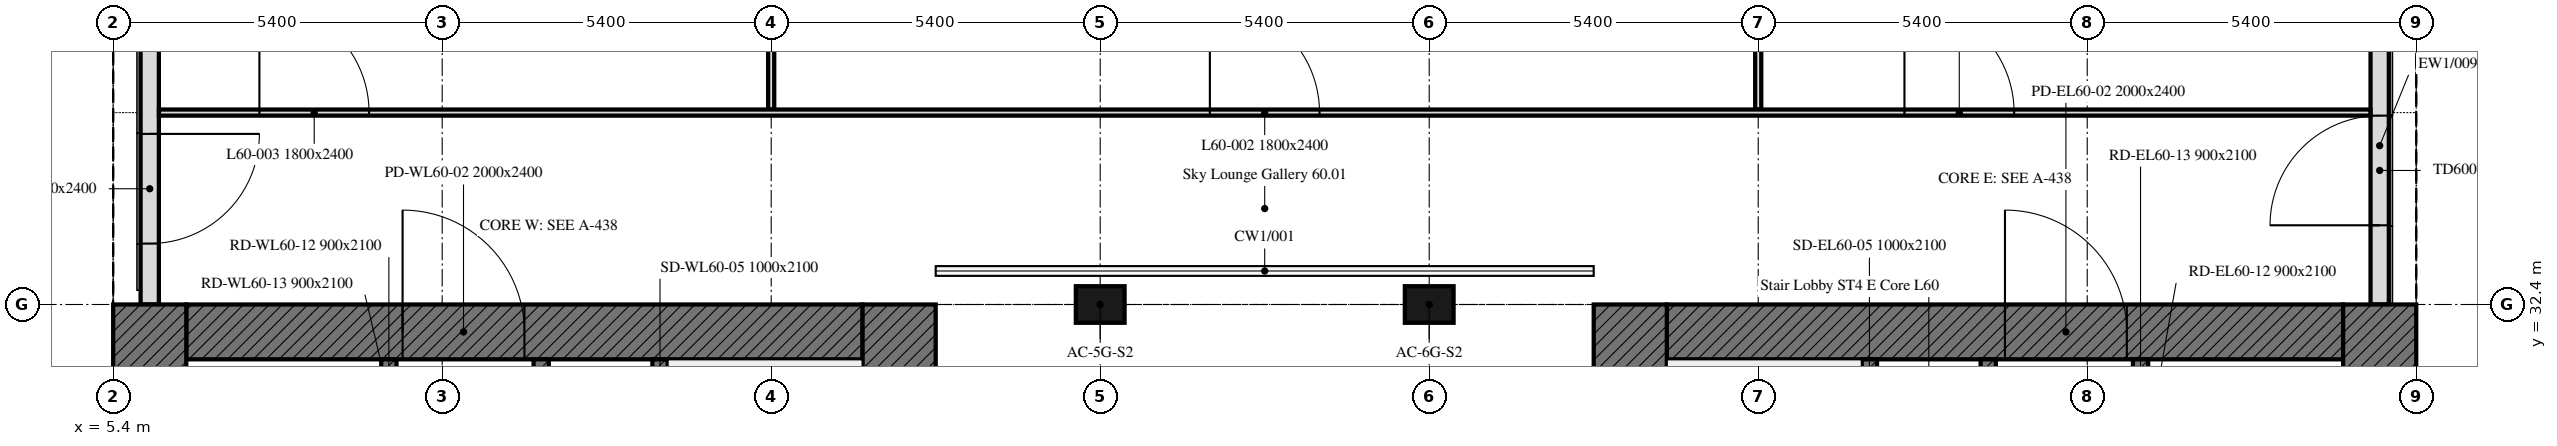
"""IFC4 building model, lengths in metres.
Left out: names, types, materials, properties, quantities, classifications, styles, units other than length and angle.
Written with IfcOpenShell. Run it as: python <this file> out.ifc"""

import sys

from ifc_helpers import new_model, si_unit, direction, frame, frame_2d, origin, origin_2d, place, context, subcontext, project, spatial, rectangle, extrude, element, fill, save


model = new_model("IFC4")
c1 = context("Model", 3, precision=1e-05, world=origin(), true_north=direction((0.0, 1.0)))
c2 = subcontext(c1, "Body", "Model", "MODEL_VIEW")
j1 = project(units=[si_unit("LENGTHUNIT", "METRE"), si_unit("PLANEANGLEUNIT", "RADIAN")], contexts=[c1])
p1 = place(None, origin())
s1 = spatial("IfcSite", under=j1, at=p1, CompositionType="ELEMENT")
p2 = place(p1, origin())
s2 = spatial("IfcBuilding", under=s1, at=p2, CompositionType="ELEMENT")
p3 = place(p2, frame((0.0, 0.0, 243.1)))
s3 = spatial("IfcBuildingStorey", under=s2, at=p3, CompositionType="ELEMENT", Elevation=243.1)
for number, where, z_axis, x_axis in (
    (1, (21.6, 32.4, 0.0), (0.0, 0.0, 1.0), (1.0, 0.0, 0.0)),
    (2, (27.0, 32.4, 0.0), (0.0, 0.0, 1.0), (1.0, 0.0, 0.0)),
):
    element("IfcColumn", number, at=place(p3, frame(where, z_axis=z_axis, x_axis=x_axis)), inside=s3, PredefinedType="COLUMN", context=c2, shape_type="SweptSolid", body=[
        extrude(rectangle(XDim=0.8, YDim=0.6, at=origin_2d()), origin(), (0.0, 0.0, 1.0), 7.5),
    ])
p4 = place(p3, frame((42.6, 32.4, 0.0), z_axis=(0.0, 0.0, 1.0), x_axis=(0.0, 1.0, 0.0)))
e3 = element("IfcWall", 3, at=p4, inside=s3, PredefinedType="SOLIDWALL", context=c2, shape_type="SweptSolid", body=[
    extrude(rectangle(XDim=5.214, YDim=0.3, at=frame_2d((2.607, 0.0))), origin(), (0.0, 0.0, 1.0), 7.5),
])
p5 = place(p4, frame((1.3, 0.0, 0.0)))
e4 = element("IfcOpeningElement", 4, at=p5, cuts=e3, PredefinedType="OPENING", context=c2, shape_type="SweptSolid", body=[
    extrude(rectangle(XDim=1.8, YDim=2.4, at=frame_2d((0.9, 1.2))), frame((0.0, 0.16, 0.0), z_axis=(0.0, -1.0, 0.0), x_axis=(1.0, 0.0, 0.0)), (0.0, 0.0, 1.0), 0.32),
])
p6 = place(p3, frame((6.0, 42.6, 0.0), z_axis=(0.0, 0.0, 1.0), x_axis=(0.0, -1.0, 0.0)))
e5 = element("IfcWall", 5, at=p6, inside=s3, PredefinedType="SOLIDWALL", context=c2, shape_type="SweptSolid", body=[
    extrude(rectangle(XDim=10.2, YDim=0.3, at=frame_2d((5.1, 0.0))), origin(), (0.0, 0.0, 1.0), 7.5),
])
p7 = place(p6, frame((1.2, 0.0, 0.0)))
e6 = element("IfcOpeningElement", 6, at=p7, cuts=e5, PredefinedType="OPENING", context=c2, shape_type="SweptSolid", body=[
    extrude(rectangle(XDim=1.8, YDim=2.4, at=frame_2d((0.9, 1.2))), frame((0.0, 0.16, 0.0), z_axis=(0.0, -1.0, 0.0), x_axis=(1.0, 0.0, 0.0)), (0.0, 0.0, 1.0), 0.32),
])
p8 = place(p6, frame((7.4, 0.0, 0.0)))
e7 = element("IfcOpeningElement", 7, at=p8, cuts=e5, PredefinedType="OPENING", context=c2, shape_type="SweptSolid", body=[
    extrude(rectangle(XDim=1.8, YDim=2.4, at=frame_2d((0.9, 1.2))), frame((0.0, 0.16, 0.0), z_axis=(0.0, -1.0, 0.0), x_axis=(1.0, 0.0, 0.0)), (0.0, 0.0, 1.0), 0.32),
])
p9 = place(p3, frame((6.6, 31.95, 0.0), z_axis=(0.0, 0.0, 1.0), x_axis=(1.0, 0.0, 0.0)))
e8 = element("IfcWall", 8, at=p9, inside=s3, PredefinedType="SOLIDWALL", context=c2, shape_type="SweptSolid", body=[
    extrude(rectangle(XDim=11.1, YDim=0.9, at=frame_2d((5.55, 0.0))), origin(), (0.0, 0.0, 1.0), 7.5),
])
p10 = place(p9, frame((3.55, 0.0, 0.0)))
e9 = element("IfcOpeningElement", 9, at=p10, cuts=e8, PredefinedType="OPENING", context=c2, shape_type="SweptSolid", body=[
    extrude(rectangle(XDim=2.0, YDim=2.4, at=frame_2d((1.0, 1.2))), frame((0.0, 0.45, 0.0), z_axis=(0.0, -1.0, 0.0), x_axis=(1.0, 0.0, 0.0)), (0.0, 0.0, 1.0), 0.9),
])
for number, where, z_axis, x_axis in (
    (10, (6.0, 16.2, 0.0), (0.0, 0.0, 1.0), (0.0, 1.0, 0.0)),
    (11, (18.3, 32.4, 0.0), (0.0, 0.0, 1.0), (0.0, -1.0, 0.0)),
):
    element("IfcWall", number, at=place(p3, frame(where, z_axis=z_axis, x_axis=x_axis)), inside=s3, PredefinedType="SOLIDWALL", context=c2, shape_type="SweptSolid", body=[
        extrude(rectangle(XDim=16.2, YDim=1.2, at=frame_2d((8.1, 0.0))), origin(), (0.0, 0.0, 1.0), 7.5),
    ])
p11 = place(p3, frame((9.925, 17.1, 0.0), z_axis=(0.0, 0.0, 1.0), x_axis=(0.0, 1.0, 0.0)))
e12 = element("IfcWall", 12, at=p11, inside=s3, PredefinedType="SOLIDWALL", context=c2, shape_type="SweptSolid", body=[
    extrude(rectangle(XDim=14.4, YDim=0.25, at=frame_2d((7.2, 0.0))), origin(), (0.0, 0.0, 1.0), 7.5),
])
p12 = place(p11, frame((4.6, 0.0, 0.0)))
e13 = element("IfcOpeningElement", 13, at=p12, cuts=e12, PredefinedType="OPENING", context=c2, shape_type="SweptSolid", body=[
    extrude(rectangle(XDim=1.0, YDim=2.1, at=frame_2d((0.5, 1.05))), frame((0.0, 0.125, 0.0), z_axis=(0.0, -1.0, 0.0), x_axis=(1.0, 0.0, 0.0)), (0.0, 0.0, 1.0), 0.25),
])
p13 = place(p11, frame((7.062, 0.0, 0.0)))
e14 = element("IfcOpeningElement", 14, at=p13, cuts=e12, PredefinedType="OPENING", context=c2, shape_type="SweptSolid", body=[
    extrude(rectangle(XDim=1.2, YDim=2.1, at=frame_2d((0.6, 1.05))), frame((0.0, 0.125, 0.0), z_axis=(0.0, -1.0, 0.0), x_axis=(1.0, 0.0, 0.0)), (0.0, 0.0, 1.0), 0.25),
])
p14 = place(p11, frame((10.106, 0.0, 0.0)))
e15 = element("IfcOpeningElement", 15, at=p14, cuts=e12, PredefinedType="OPENING", context=c2, shape_type="SweptSolid", body=[
    extrude(rectangle(XDim=0.9, YDim=2.1, at=frame_2d((0.45, 1.05))), frame((0.0, 0.125, 0.0), z_axis=(0.0, -1.0, 0.0), x_axis=(1.0, 0.0, 0.0)), (0.0, 0.0, 1.0), 0.25),
])
p15 = place(p11, frame((12.048, 0.0, 0.0)))
e16 = element("IfcOpeningElement", 16, at=p15, cuts=e12, PredefinedType="OPENING", context=c2, shape_type="SweptSolid", body=[
    extrude(rectangle(XDim=0.9, YDim=2.1, at=frame_2d((0.45, 1.05))), frame((0.0, 0.125, 0.0), z_axis=(0.0, -1.0, 0.0), x_axis=(1.0, 0.0, 0.0)), (0.0, 0.0, 1.0), 0.25),
])
p16 = place(p11, frame((13.354, 0.0, 0.0)))
e17 = element("IfcOpeningElement", 17, at=p16, cuts=e12, PredefinedType="OPENING", context=c2, shape_type="SweptSolid", body=[
    extrude(rectangle(XDim=0.9, YDim=2.1, at=frame_2d((0.45, 1.05))), frame((0.0, 0.125, 0.0), z_axis=(0.0, -1.0, 0.0), x_axis=(1.0, 0.0, 0.0)), (0.0, 0.0, 1.0), 0.25),
])
p17 = place(p3, frame((14.375, 17.1, 0.0), z_axis=(0.0, 0.0, 1.0), x_axis=(0.0, 1.0, 0.0)))
e18 = element("IfcWall", 18, at=p17, inside=s3, PredefinedType="SOLIDWALL", context=c2, shape_type="SweptSolid", body=[
    extrude(rectangle(XDim=14.4, YDim=0.25, at=frame_2d((7.2, 0.0))), origin(), (0.0, 0.0, 1.0), 7.5),
])
p18 = place(p17, frame((13.15, 0.0, 0.0)))
e19 = element("IfcOpeningElement", 19, at=p18, cuts=e18, PredefinedType="OPENING", context=c2, shape_type="SweptSolid", body=[
    extrude(rectangle(XDim=1.0, YDim=2.1, at=frame_2d((0.5, 1.05))), frame((0.0, 0.125, 0.0), z_axis=(0.0, -1.0, 0.0), x_axis=(1.0, 0.0, 0.0)), (0.0, 0.0, 1.0), 0.25),
])
p19 = place(p17, frame((0.6, 0.0, 0.0)))
e20 = element("IfcOpeningElement", 20, at=p19, cuts=e18, PredefinedType="OPENING", context=c2, shape_type="SweptSolid", body=[
    extrude(rectangle(XDim=1.1, YDim=2.1, at=frame_2d((0.55, 1.05))), frame((0.0, 0.125, 0.0), z_axis=(0.0, -1.0, 0.0), x_axis=(1.0, 0.0, 0.0)), (0.0, 0.0, 1.0), 0.25),
])
p20 = place(p17, frame((3.15, 0.0, 0.0)))
e21 = element("IfcOpeningElement", 21, at=p20, cuts=e18, PredefinedType="OPENING", context=c2, shape_type="SweptSolid", body=[
    extrude(rectangle(XDim=1.1, YDim=2.1, at=frame_2d((0.55, 1.05))), frame((0.0, 0.125, 0.0), z_axis=(0.0, -1.0, 0.0), x_axis=(1.0, 0.0, 0.0)), (0.0, 0.0, 1.0), 0.25),
])
p21 = place(p17, frame((6.025, 0.0, 0.0)))
e22 = element("IfcOpeningElement", 22, at=p21, cuts=e18, PredefinedType="OPENING", context=c2, shape_type="SweptSolid", body=[
    extrude(rectangle(XDim=1.2, YDim=2.1, at=frame_2d((0.6, 1.05))), frame((0.0, 0.125, 0.0), z_axis=(0.0, -1.0, 0.0), x_axis=(1.0, 0.0, 0.0)), (0.0, 0.0, 1.0), 0.25),
])
p22 = place(p3, frame((12.425, 29.4, 0.0), z_axis=(0.0, 0.0, 1.0), x_axis=(0.0, 1.0, 0.0)))
e23 = element("IfcWall", 23, at=p22, inside=s3, PredefinedType="SOLIDWALL", context=c2, shape_type="SweptSolid", body=[
    extrude(rectangle(XDim=2.1, YDim=0.25, at=frame_2d((1.05, 0.0))), origin(), (0.0, 0.0, 1.0), 7.5),
])
p23 = place(p22, frame((0.5, 0.0, 0.0)))
e24 = element("IfcOpeningElement", 24, at=p23, cuts=e23, PredefinedType="OPENING", context=c2, shape_type="SweptSolid", body=[
    extrude(rectangle(XDim=1.0, YDim=2.1, at=frame_2d((0.5, 1.05))), frame((0.0, 0.125, 0.0), z_axis=(0.0, -1.0, 0.0), x_axis=(1.0, 0.0, 0.0)), (0.0, 0.0, 1.0), 0.25),
])
p24 = place(p3, frame((30.9, 31.95, 0.0), z_axis=(0.0, 0.0, 1.0), x_axis=(1.0, 0.0, 0.0)))
e25 = element("IfcWall", 25, at=p24, inside=s3, PredefinedType="SOLIDWALL", context=c2, shape_type="SweptSolid", body=[
    extrude(rectangle(XDim=11.1, YDim=0.9, at=frame_2d((5.55, 0.0))), origin(), (0.0, 0.0, 1.0), 7.5),
])
p25 = place(p24, frame((5.55, 0.0, 0.0)))
e26 = element("IfcOpeningElement", 26, at=p25, cuts=e25, PredefinedType="OPENING", context=c2, shape_type="SweptSolid", body=[
    extrude(rectangle(XDim=2.0, YDim=2.4, at=frame_2d((1.0, 1.2))), frame((0.0, 0.45, 0.0), z_axis=(0.0, -1.0, 0.0), x_axis=(1.0, 0.0, 0.0)), (0.0, 0.0, 1.0), 0.9),
])
for number, where, z_axis, x_axis in (
    (27, (42.6, 32.4, 0.0), (0.0, 0.0, 1.0), (0.0, -1.0, 0.0)),
    (28, (30.3, 16.2, 0.0), (0.0, 0.0, 1.0), (0.0, 1.0, 0.0)),
):
    element("IfcWall", number, at=place(p3, frame(where, z_axis=z_axis, x_axis=x_axis)), inside=s3, PredefinedType="SOLIDWALL", context=c2, shape_type="SweptSolid", body=[
        extrude(rectangle(XDim=16.2, YDim=1.2, at=frame_2d((8.1, 0.0))), origin(), (0.0, 0.0, 1.0), 7.5),
    ])
p26 = place(p3, frame((38.675, 17.1, 0.0), z_axis=(0.0, 0.0, 1.0), x_axis=(0.0, 1.0, 0.0)))
e29 = element("IfcWall", 29, at=p26, inside=s3, PredefinedType="SOLIDWALL", context=c2, shape_type="SweptSolid", body=[
    extrude(rectangle(XDim=14.4, YDim=0.25, at=frame_2d((7.2, 0.0))), origin(), (0.0, 0.0, 1.0), 7.5),
])
p27 = place(p26, frame((4.6, 0.0, 0.0)))
e30 = element("IfcOpeningElement", 30, at=p27, cuts=e29, PredefinedType="OPENING", context=c2, shape_type="SweptSolid", body=[
    extrude(rectangle(XDim=1.0, YDim=2.1, at=frame_2d((0.5, 1.05))), frame((0.0, 0.125, 0.0), z_axis=(0.0, -1.0, 0.0), x_axis=(1.0, 0.0, 0.0)), (0.0, 0.0, 1.0), 0.25),
])
p28 = place(p26, frame((7.062, 0.0, 0.0)))
e31 = element("IfcOpeningElement", 31, at=p28, cuts=e29, PredefinedType="OPENING", context=c2, shape_type="SweptSolid", body=[
    extrude(rectangle(XDim=1.2, YDim=2.1, at=frame_2d((0.6, 1.05))), frame((0.0, 0.125, 0.0), z_axis=(0.0, -1.0, 0.0), x_axis=(1.0, 0.0, 0.0)), (0.0, 0.0, 1.0), 0.25),
])
p29 = place(p26, frame((9.979, 0.0, 0.0)))
e32 = element("IfcOpeningElement", 32, at=p29, cuts=e29, PredefinedType="OPENING", context=c2, shape_type="SweptSolid", body=[
    extrude(rectangle(XDim=0.9, YDim=2.1, at=frame_2d((0.45, 1.05))), frame((0.0, 0.125, 0.0), z_axis=(0.0, -1.0, 0.0), x_axis=(1.0, 0.0, 0.0)), (0.0, 0.0, 1.0), 0.25),
])
p30 = place(p26, frame((11.92, 0.0, 0.0)))
e33 = element("IfcOpeningElement", 33, at=p30, cuts=e29, PredefinedType="OPENING", context=c2, shape_type="SweptSolid", body=[
    extrude(rectangle(XDim=0.9, YDim=2.1, at=frame_2d((0.45, 1.05))), frame((0.0, 0.125, 0.0), z_axis=(0.0, -1.0, 0.0), x_axis=(1.0, 0.0, 0.0)), (0.0, 0.0, 1.0), 0.25),
])
p31 = place(p26, frame((13.354, 0.0, 0.0)))
e34 = element("IfcOpeningElement", 34, at=p31, cuts=e29, PredefinedType="OPENING", context=c2, shape_type="SweptSolid", body=[
    extrude(rectangle(XDim=0.9, YDim=2.1, at=frame_2d((0.45, 1.05))), frame((0.0, 0.125, 0.0), z_axis=(0.0, -1.0, 0.0), x_axis=(1.0, 0.0, 0.0)), (0.0, 0.0, 1.0), 0.25),
])
p32 = place(p3, frame((34.225, 17.1, 0.0), z_axis=(0.0, 0.0, 1.0), x_axis=(0.0, 1.0, 0.0)))
e35 = element("IfcWall", 35, at=p32, inside=s3, PredefinedType="SOLIDWALL", context=c2, shape_type="SweptSolid", body=[
    extrude(rectangle(XDim=14.4, YDim=0.25, at=frame_2d((7.2, 0.0))), origin(), (0.0, 0.0, 1.0), 7.5),
])
p33 = place(p32, frame((13.15, 0.0, 0.0)))
e36 = element("IfcOpeningElement", 36, at=p33, cuts=e35, PredefinedType="OPENING", context=c2, shape_type="SweptSolid", body=[
    extrude(rectangle(XDim=1.0, YDim=2.1, at=frame_2d((0.5, 1.05))), frame((0.0, 0.125, 0.0), z_axis=(0.0, -1.0, 0.0), x_axis=(1.0, 0.0, 0.0)), (0.0, 0.0, 1.0), 0.25),
])
p34 = place(p32, frame((0.6, 0.0, 0.0)))
e37 = element("IfcOpeningElement", 37, at=p34, cuts=e35, PredefinedType="OPENING", context=c2, shape_type="SweptSolid", body=[
    extrude(rectangle(XDim=1.1, YDim=2.1, at=frame_2d((0.55, 1.05))), frame((0.0, 0.125, 0.0), z_axis=(0.0, -1.0, 0.0), x_axis=(1.0, 0.0, 0.0)), (0.0, 0.0, 1.0), 0.25),
])
p35 = place(p32, frame((3.15, 0.0, 0.0)))
e38 = element("IfcOpeningElement", 38, at=p35, cuts=e35, PredefinedType="OPENING", context=c2, shape_type="SweptSolid", body=[
    extrude(rectangle(XDim=1.1, YDim=2.1, at=frame_2d((0.55, 1.05))), frame((0.0, 0.125, 0.0), z_axis=(0.0, -1.0, 0.0), x_axis=(1.0, 0.0, 0.0)), (0.0, 0.0, 1.0), 0.25),
])
p36 = place(p32, frame((6.025, 0.0, 0.0)))
e39 = element("IfcOpeningElement", 39, at=p36, cuts=e35, PredefinedType="OPENING", context=c2, shape_type="SweptSolid", body=[
    extrude(rectangle(XDim=1.2, YDim=2.1, at=frame_2d((0.6, 1.05))), frame((0.0, 0.125, 0.0), z_axis=(0.0, -1.0, 0.0), x_axis=(1.0, 0.0, 0.0)), (0.0, 0.0, 1.0), 0.25),
])
p37 = place(p3, frame((36.175, 29.4, 0.0), z_axis=(0.0, 0.0, 1.0), x_axis=(0.0, 1.0, 0.0)))
e40 = element("IfcWall", 40, at=p37, inside=s3, PredefinedType="SOLIDWALL", context=c2, shape_type="SweptSolid", body=[
    extrude(rectangle(XDim=2.1, YDim=0.25, at=frame_2d((1.05, 0.0))), origin(), (0.0, 0.0, 1.0), 7.5),
])
p38 = place(p37, frame((0.5, 0.0, 0.0)))
e41 = element("IfcOpeningElement", 41, at=p38, cuts=e40, PredefinedType="OPENING", context=c2, shape_type="SweptSolid", body=[
    extrude(rectangle(XDim=1.0, YDim=2.1, at=frame_2d((0.5, 1.05))), frame((0.0, 0.125, 0.0), z_axis=(0.0, -1.0, 0.0), x_axis=(1.0, 0.0, 0.0)), (0.0, 0.0, 1.0), 0.25),
])
for number, where, z_axis, x_axis in (
    (42, (32.4, 37.43, 0.0), (0.0, 0.0, 1.0), (0.0, -1.0, 0.0)),
    (43, (16.2, 37.43, 0.0), (0.0, 0.0, 1.0), (0.0, -1.0, 0.0)),
):
    element("IfcWall", number, at=place(p3, frame(where, z_axis=z_axis, x_axis=x_axis)), inside=s3, PredefinedType="PARTITIONING", context=c2, shape_type="SweptSolid", body=[
        extrude(rectangle(XDim=1.83, YDim=0.1, at=frame_2d((0.915, 0.0))), origin(), (0.0, 0.0, 1.0), 7.5),
    ])
p39 = place(p3, frame((6.151, 35.55, 0.0), z_axis=(0.0, 0.0, 1.0), x_axis=(1.0, 0.0, 0.0)))
e44 = element("IfcWall", 44, at=p39, inside=s3, PredefinedType="PARTITIONING", context=c2, shape_type="SweptSolid", body=[
    extrude(rectangle(XDim=36.298, YDim=0.1, at=frame_2d((18.149, 0.0))), origin(), (0.0, 0.0, 1.0), 7.5),
])
p40 = place(p39, frame((28.649, 0.0, 0.0)))
e45 = element("IfcOpeningElement", 45, at=p40, cuts=e44, PredefinedType="OPENING", context=c2, shape_type="SweptSolid", body=[
    extrude(rectangle(XDim=1.8, YDim=2.4, at=frame_2d((0.9, 1.2))), frame((0.0, 0.05, 0.0), z_axis=(0.0, -1.0, 0.0), x_axis=(1.0, 0.0, 0.0)), (0.0, 0.0, 1.0), 0.1),
])
p41 = place(p39, frame((17.249, 0.0, 0.0)))
e46 = element("IfcOpeningElement", 46, at=p41, cuts=e44, PredefinedType="OPENING", context=c2, shape_type="SweptSolid", body=[
    extrude(rectangle(XDim=1.8, YDim=2.4, at=frame_2d((0.9, 1.2))), frame((0.0, 0.05, 0.0), z_axis=(0.0, -1.0, 0.0), x_axis=(1.0, 0.0, 0.0)), (0.0, 0.0, 1.0), 0.1),
])
p42 = place(p39, frame((1.649, 0.0, 0.0)))
e47 = element("IfcOpeningElement", 47, at=p42, cuts=e44, PredefinedType="OPENING", context=c2, shape_type="SweptSolid", body=[
    extrude(rectangle(XDim=1.8, YDim=2.4, at=frame_2d((0.9, 1.2))), frame((0.0, 0.05, 0.0), z_axis=(0.0, -1.0, 0.0), x_axis=(1.0, 0.0, 0.0)), (0.0, 0.0, 1.0), 0.1),
])
p43 = place(p5, origin())
e48 = element("IfcDoor", 48, at=p43, inside=s3, OperationType="DOUBLE_DOOR_DOUBLE_SWING", PredefinedType="DOOR", context=c2, shape_type="SweptSolid", body=[
    extrude(rectangle(XDim=1.8, YDim=2.4, at=frame_2d((0.9, 1.2))), frame((0.0, 0.025, 0.0), z_axis=(0.0, -1.0, 0.0), x_axis=(1.0, 0.0, 0.0)), (0.0, 0.0, 1.0), 0.05),
])
fill(e4, e48)
p44 = place(p8, origin())
e49 = element("IfcDoor", 49, at=p44, inside=s3, OperationType="DOUBLE_DOOR_DOUBLE_SWING", PredefinedType="DOOR", context=c2, shape_type="SweptSolid", body=[
    extrude(rectangle(XDim=1.8, YDim=2.4, at=frame_2d((0.9, 1.2))), frame((0.0, 0.025, 0.0), z_axis=(0.0, -1.0, 0.0), x_axis=(1.0, 0.0, 0.0)), (0.0, 0.0, 1.0), 0.05),
])
fill(e7, e49)
p45 = place(p10, origin())
e50 = element("IfcDoor", 50, at=p45, inside=s3, OperationType="DOUBLE_DOOR_SINGLE_SWING", PredefinedType="DOOR", context=c2, shape_type="SweptSolid", body=[
    extrude(rectangle(XDim=2.0, YDim=2.4, at=frame_2d((1.0, 1.2))), frame((0.0, 0.025, 0.0), z_axis=(0.0, -1.0, 0.0), x_axis=(1.0, 0.0, 0.0)), (0.0, 0.0, 1.0), 0.05),
])
fill(e9, e50)
p46 = place(p25, origin())
e51 = element("IfcDoor", 51, at=p46, inside=s3, OperationType="DOUBLE_DOOR_SINGLE_SWING", PredefinedType="DOOR", context=c2, shape_type="SweptSolid", body=[
    extrude(rectangle(XDim=2.0, YDim=2.4, at=frame_2d((1.0, 1.2))), frame((0.0, 0.025, 0.0), z_axis=(0.0, -1.0, 0.0), x_axis=(1.0, 0.0, 0.0)), (0.0, 0.0, 1.0), 0.05),
])
fill(e26, e51)
p47 = place(p40, origin())
e52 = element("IfcDoor", 52, at=p47, inside=s3, OperationType="DOUBLE_DOOR_SINGLE_SWING", PredefinedType="DOOR", context=c2, shape_type="SweptSolid", body=[
    extrude(rectangle(XDim=1.8, YDim=2.4, at=frame_2d((0.9, 1.2))), frame((0.0, 0.025, 0.0), z_axis=(0.0, -1.0, 0.0), x_axis=(1.0, 0.0, 0.0)), (0.0, 0.0, 1.0), 0.05),
])
fill(e45, e52)
p48 = place(p41, origin())
e53 = element("IfcDoor", 53, at=p48, inside=s3, OperationType="DOUBLE_DOOR_SINGLE_SWING", PredefinedType="DOOR", context=c2, shape_type="SweptSolid", body=[
    extrude(rectangle(XDim=1.8, YDim=2.4, at=frame_2d((0.9, 1.2))), frame((0.0, 0.025, 0.0), z_axis=(0.0, -1.0, 0.0), x_axis=(1.0, 0.0, 0.0)), (0.0, 0.0, 1.0), 0.05),
])
fill(e46, e53)
p49 = place(p42, origin())
e54 = element("IfcDoor", 54, at=p49, inside=s3, OperationType="DOUBLE_DOOR_SINGLE_SWING", PredefinedType="DOOR", context=c2, shape_type="SweptSolid", body=[
    extrude(rectangle(XDim=1.8, YDim=2.4, at=frame_2d((0.9, 1.2))), frame((0.0, 0.025, 0.0), z_axis=(0.0, -1.0, 0.0), x_axis=(1.0, 0.0, 0.0)), (0.0, 0.0, 1.0), 0.05),
])
fill(e47, e54)
save(model, sys.argv[1])
